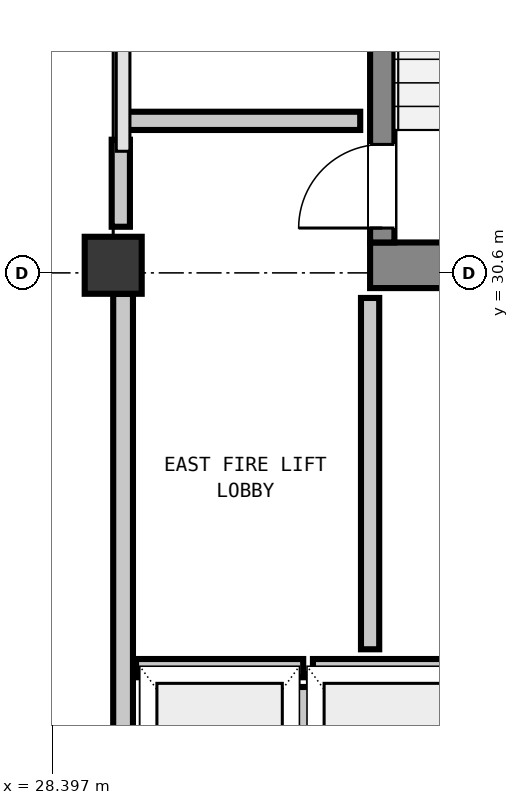
"""IFC4 building model, lengths in metres.
Left out: names, types, materials, properties, quantities, classifications, styles, units other than length and angle.
Written with IfcOpenShell. Run it as: python <this file> out.ifc"""

import sys

from ifc_helpers import new_model, si_unit, direction, frame, frame_2d, origin, origin_2d, place, context, subcontext, project, spatial, rectangle, extrude, element, fill, save


model = new_model("IFC4")
c1 = context("Model", 3, precision=1e-05, world=origin(), true_north=direction((0.0, 1.0)))
c2 = subcontext(c1, "Body", "Model", "MODEL_VIEW")
j1 = project(units=[si_unit("LENGTHUNIT", "METRE"), si_unit("PLANEANGLEUNIT", "RADIAN")], contexts=[c1])
p1 = place(None, origin())
s1 = spatial("IfcSite", under=j1, at=p1, CompositionType="ELEMENT")
p2 = place(p1, origin())
s2 = spatial("IfcBuilding", under=s1, at=p2, CompositionType="ELEMENT")
p3 = place(p2, frame((0.0, 0.0, 287.88)))
s3 = spatial("IfcBuildingStorey", under=s2, at=p3, CompositionType="ELEMENT", Elevation=287.88)
p4 = place(p3, frame((32.58, 30.7, 0.0), z_axis=(0.0, 0.0, 1.0), x_axis=(1.0, 0.0, 0.0)))
e1 = element("IfcWall", 1, at=p4, inside=s3, PredefinedType="SHEAR", context=c2, shape_type="SweptSolid", body=[
    extrude(rectangle(XDim=4.08, YDim=0.6, at=frame_2d((2.04, 0.0))), origin(), (0.0, 0.0, 1.0), 4.9),
])
p5 = place(p3, frame((32.74, 31.0, 0.0), z_axis=(0.0, 0.0, 1.0), x_axis=(0.0, 1.0, 0.0)))
e2 = element("IfcWall", 2, at=p5, inside=s3, PredefinedType="SHEAR", context=c2, shape_type="SweptSolid", body=[
    extrude(rectangle(XDim=7.8, YDim=0.32, at=frame_2d((3.9, 0.0))), origin(), (0.0, 0.0, 1.0), 4.9),
])
p6 = place(p5, frame((0.19, 0.0, 0.0)))
e3 = element("IfcOpeningElement", 3, at=p6, cuts=e2, PredefinedType="OPENING", context=c2, shape_type="SweptSolid", body=[
    extrude(rectangle(XDim=1.1, YDim=2.15, at=frame_2d((0.55, 1.075))), frame((0.0, 0.17, 0.0), z_axis=(0.0, -1.0, 0.0), x_axis=(1.0, 0.0, 0.0)), (0.0, 0.0, 1.0), 0.34),
])
p7 = place(p3, frame((29.2, 30.7, 0.0), z_axis=(0.0, 0.0, 1.0), x_axis=(1.0, 0.0, 0.0)))
e4 = element("IfcColumn", 4, at=p7, inside=s3, PredefinedType="COLUMN", context=c2, shape_type="SweptSolid", body=[
    extrude(rectangle(XDim=0.75, YDim=0.75, at=origin_2d()), origin(), (0.0, 0.0, 1.0), 4.9),
])
p8 = place(p3, frame((29.33, 22.3, 0.0), z_axis=(0.0, 0.0, 1.0), x_axis=(0.0, 1.0, 0.0)))
e5 = element("IfcWall", 5, at=p8, inside=s3, PredefinedType="STANDARD", context=c2, shape_type="SweptSolid", body=[
    extrude(rectangle(XDim=8.025, YDim=0.26, at=frame_2d((4.012, 0.0))), origin(), (0.0, 0.0, 1.0), 3.754),
])
p9 = place(p3, frame((29.5, 25.4, 0.0), z_axis=(0.0, 0.0, 1.0), x_axis=(1.0, 0.0, 0.0)))
e6 = element("IfcWall", 6, at=p9, inside=s3, PredefinedType="PARTITIONING", context=c2, shape_type="SweptSolid", body=[
    extrude(rectangle(XDim=2.2, YDim=0.24, at=frame_2d((1.1, 0.0))), origin(), (0.0, 0.0, 1.0), 4.62),
])
p10 = place(p3, frame((31.7, 22.848, 0.0), z_axis=(0.0, 0.0, 1.0), x_axis=(0.0, 1.0, 0.0)))
e7 = element("IfcWall", 7, at=p10, inside=s3, PredefinedType="PARTITIONING", context=c2, shape_type="SweptSolid", body=[
    extrude(rectangle(XDim=2.304, YDim=0.24, at=frame_2d((1.152, 0.0))), origin(), (0.0, 0.0, 1.0), 4.62),
])
p11 = place(p3, frame((31.828, 25.4, 0.0), z_axis=(0.0, 0.0, 1.0), x_axis=(1.0, 0.0, 0.0)))
e8 = element("IfcWall", 8, at=p11, inside=s3, PredefinedType="PARTITIONING", context=c2, shape_type="SweptSolid", body=[
    extrude(rectangle(XDim=2.072, YDim=0.24, at=frame_2d((1.036, 0.0))), origin(), (0.0, 0.0, 1.0), 4.62),
])
p12 = place(p3, frame((29.3, 32.6, 0.0), z_axis=(0.0, 0.0, 1.0), x_axis=(1.0, 0.0, 0.0)))
e9 = element("IfcWall", 9, at=p12, inside=s3, PredefinedType="PARTITIONING", context=c2, shape_type="SweptSolid", body=[
    extrude(rectangle(XDim=3.15, YDim=0.24, at=frame_2d((1.575, 0.0))), origin(), (0.0, 0.0, 1.0), 4.62),
])
p13 = place(p3, frame((29.3, 31.207, 0.0), z_axis=(0.0, 0.0, 1.0), x_axis=(0.0, 1.0, 0.0)))
e10 = element("IfcWall", 10, at=p13, inside=s3, PredefinedType="PARTITIONING", context=c2, shape_type="SweptSolid", body=[
    extrude(rectangle(XDim=1.145, YDim=0.24, at=frame_2d((0.573, 0.0))), origin(), (0.0, 0.0, 1.0), 3.912),
])
p14 = place(p3, frame((32.58, 25.648, 0.0), z_axis=(0.0, 0.0, 1.0), x_axis=(0.0, 1.0, 0.0)))
e11 = element("IfcWall", 11, at=p14, inside=s3, PredefinedType="PARTITIONING", context=c2, shape_type="SweptSolid", body=[
    extrude(rectangle(XDim=4.622, YDim=0.24, at=frame_2d((2.311, 0.0))), origin(), (0.0, 0.0, 1.0), 4.62),
])
p15 = place(p6, origin())
e12 = element("IfcDoor", 12, at=p15, inside=s3, OperationType="SINGLE_SWING_LEFT", PredefinedType="DOOR", context=c2, shape_type="SweptSolid", body=[
    extrude(rectangle(XDim=1.1, YDim=2.15, at=frame_2d((0.55, 1.075))), frame((0.0, 0.025, 0.0), z_axis=(0.0, -1.0, 0.0), x_axis=(1.0, 0.0, 0.0)), (0.0, 0.0, 1.0), 0.05),
])
fill(e3, e12)
save(model, sys.argv[1])
